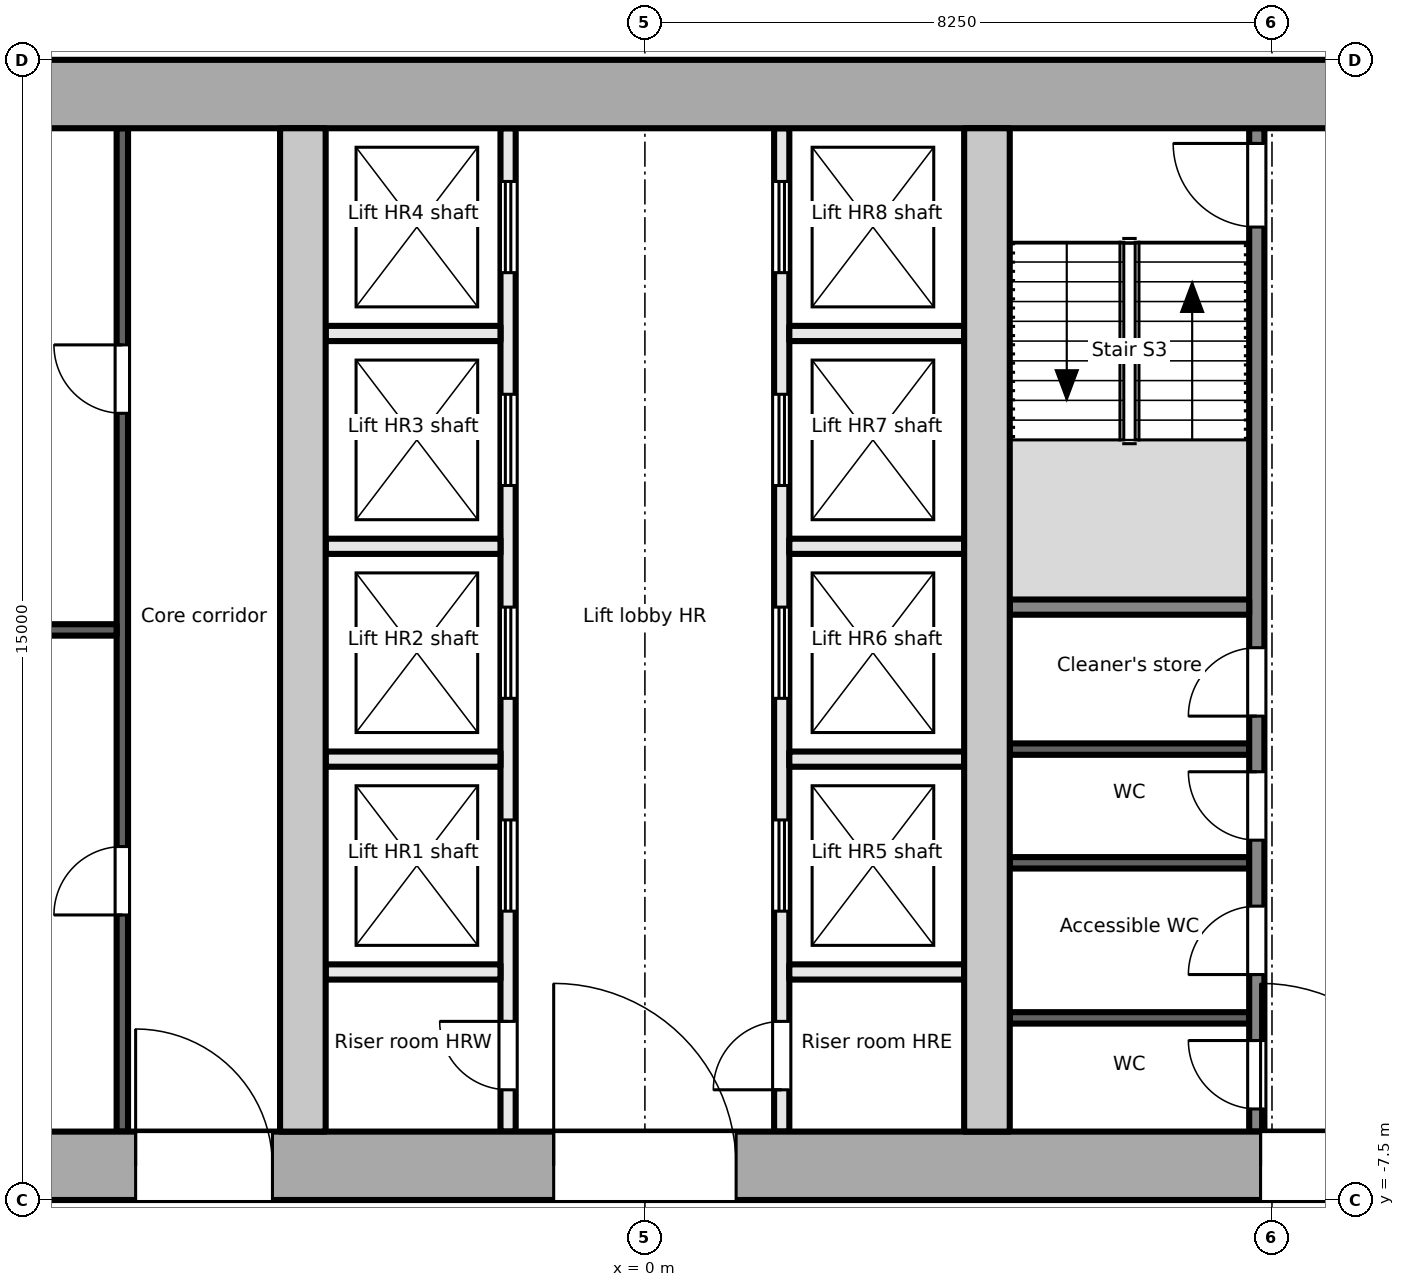
"""IFC4 building model, lengths in metres.
Left out: names, types, materials, properties, quantities, classifications, styles, units other than length and angle.
Written with IfcOpenShell. Run it as: python <this file> out.ifc"""

import sys

from ifc_helpers import new_model, si_unit, direction, frame, frame_2d, origin, place, context, subcontext, project, spatial, rectangle, extrude, element, fill, save


model = new_model("IFC4")
c1 = context("Model", 3, precision=1e-05, world=origin(), true_north=direction((0.0, 1.0)))
c2 = subcontext(c1, "Body", "Model", "MODEL_VIEW")
j1 = project(units=[si_unit("LENGTHUNIT", "METRE"), si_unit("PLANEANGLEUNIT", "RADIAN")], contexts=[c1])
p1 = place(None, origin())
s1 = spatial("IfcSite", under=j1, at=p1, CompositionType="ELEMENT")
p2 = place(p1, origin())
s2 = spatial("IfcBuilding", under=s1, at=p2, CompositionType="ELEMENT")
p3 = place(p2, frame((0.0, 0.0, 274.6)))
s3 = spatial("IfcBuildingStorey", under=s2, at=p3, CompositionType="ELEMENT", Elevation=274.6)
p4 = place(p3, frame((-18.0, -7.05, -0.2), z_axis=(0.0, 0.0, 1.0), x_axis=(1.0, 0.0, 0.0)))
e1 = element("IfcWall", 1, at=p4, inside=s3, PredefinedType="SHEAR", context=c2, shape_type="SweptSolid", body=[
    extrude(rectangle(XDim=36.0, YDim=0.9, at=frame_2d((18.0, 0.0))), origin(), (0.0, 0.0, 1.0), 3.9),
])
p5 = place(p4, frame((11.3, 0.0, 0.2)))
e2 = element("IfcOpeningElement", 2, at=p5, cuts=e1, PredefinedType="OPENING", context=c2, shape_type="SweptSolid", body=[
    extrude(rectangle(XDim=1.8, YDim=2.1, at=frame_2d((0.9, 1.05))), frame((0.0, 0.46, 0.0), z_axis=(0.0, -1.0, 0.0), x_axis=(1.0, 0.0, 0.0)), (0.0, 0.0, 1.0), 0.921),
])
p6 = place(p4, frame((16.8, 0.0, 0.2)))
e3 = element("IfcOpeningElement", 3, at=p6, cuts=e1, PredefinedType="OPENING", context=c2, shape_type="SweptSolid", body=[
    extrude(rectangle(XDim=2.4, YDim=2.1, at=frame_2d((1.2, 1.05))), frame((0.0, 0.46, 0.0), z_axis=(0.0, -1.0, 0.0), x_axis=(1.0, 0.0, 0.0)), (0.0, 0.0, 1.0), 0.921),
])
p7 = place(p4, frame((26.1, 0.0, 0.2)))
e4 = element("IfcOpeningElement", 4, at=p7, cuts=e1, PredefinedType="OPENING", context=c2, shape_type="SweptSolid", body=[
    extrude(rectangle(XDim=2.4, YDim=2.1, at=frame_2d((1.2, 1.05))), frame((0.0, 0.46, 0.0), z_axis=(0.0, -1.0, 0.0), x_axis=(1.0, 0.0, 0.0)), (0.0, 0.0, 1.0), 0.921),
])
p8 = place(p3, frame((-18.0, 7.05, -0.2), z_axis=(0.0, 0.0, 1.0), x_axis=(1.0, 0.0, 0.0)))
e5 = element("IfcWall", 5, at=p8, inside=s3, PredefinedType="SHEAR", context=c2, shape_type="SweptSolid", body=[
    extrude(rectangle(XDim=36.0, YDim=0.9, at=frame_2d((18.0, 0.0))), origin(), (0.0, 0.0, 1.0), 3.9),
])
for number, where, z_axis, x_axis in (
    (6, (-4.5, -6.6, -0.2), (0.0, 0.0, 1.0), (0.0, 1.0, 0.0)),
    (7, (4.5, -6.6, -0.2), (0.0, 0.0, 1.0), (0.0, 1.0, 0.0)),
):
    element("IfcWall", number, at=place(p3, frame(where, z_axis=z_axis, x_axis=x_axis)), inside=s3, PredefinedType="SHEAR", context=c2, shape_type="SweptSolid", body=[
        extrude(rectangle(XDim=13.2, YDim=0.6, at=frame_2d((6.6, 0.0))), origin(), (0.0, 0.0, 1.0), 3.9),
    ])
p9 = place(p3, frame((-6.875, -6.6, 0.0), z_axis=(0.0, 0.0, 1.0), x_axis=(0.0, 1.0, 0.0)))
e8 = element("IfcWall", 8, at=p9, inside=s3, PredefinedType="PARTITIONING", context=c2, shape_type="SweptSolid", body=[
    extrude(rectangle(XDim=13.2, YDim=0.15, at=frame_2d((6.6, 0.0))), origin(), (0.0, 0.0, 1.0), 3.7),
])
p10 = place(p9, frame((2.85, 0.0, 0.0)))
e9 = element("IfcOpeningElement", 9, at=p10, cuts=e8, PredefinedType="OPENING", context=c2, shape_type="SweptSolid", body=[
    extrude(rectangle(XDim=0.9, YDim=2.1, at=frame_2d((0.45, 1.05))), frame((0.0, 0.085, 0.0), z_axis=(0.0, -1.0, 0.0), x_axis=(1.0, 0.0, 0.0)), (0.0, 0.0, 1.0), 0.171),
])
p11 = place(p9, frame((9.45, 0.0, 0.0)))
e10 = element("IfcOpeningElement", 10, at=p11, cuts=e8, PredefinedType="OPENING", context=c2, shape_type="SweptSolid", body=[
    extrude(rectangle(XDim=0.9, YDim=2.1, at=frame_2d((0.45, 1.05))), frame((0.0, 0.085, 0.0), z_axis=(0.0, -1.0, 0.0), x_axis=(1.0, 0.0, 0.0)), (0.0, 0.0, 1.0), 0.171),
])
p12 = place(p3, frame((-13.2, 0.0, 0.0), z_axis=(0.0, 0.0, 1.0), x_axis=(1.0, 0.0, 0.0)))
e11 = element("IfcWall", 11, at=p12, inside=s3, PredefinedType="PARTITIONING", context=c2, shape_type="SweptSolid", body=[
    extrude(rectangle(XDim=6.25, YDim=0.15, at=frame_2d((3.125, 0.0))), origin(), (0.0, 0.0, 1.0), 3.7),
])
p13 = place(p3, frame((-1.8, -6.6, 0.0), z_axis=(0.0, 0.0, 1.0), x_axis=(0.0, 1.0, 0.0)))
e12 = element("IfcWall", 12, at=p13, inside=s3, PredefinedType="PARTITIONING", context=c2, shape_type="SweptSolid", body=[
    extrude(rectangle(XDim=13.2, YDim=0.2, at=frame_2d((6.6, 0.0))), origin(), (0.0, 0.0, 1.0), 3.7),
])
p14 = place(p13, frame((0.55, 0.0, 0.0)))
e13 = element("IfcOpeningElement", 13, at=p14, cuts=e12, PredefinedType="OPENING", context=c2, shape_type="SweptSolid", body=[
    extrude(rectangle(XDim=0.9, YDim=2.1, at=frame_2d((0.45, 1.05))), frame((0.0, 0.111, 0.0), z_axis=(0.0, -1.0, 0.0), x_axis=(1.0, 0.0, 0.0)), (0.0, 0.0, 1.0), 0.221),
])
p15 = place(p13, frame((2.9, 0.0, 0.0)))
e14 = element("IfcOpeningElement", 14, at=p15, cuts=e12, PredefinedType="OPENING", context=c2, shape_type="SweptSolid", body=[
    extrude(rectangle(XDim=1.2, YDim=2.1, at=frame_2d((0.6, 1.05))), frame((0.0, 0.111, 0.0), z_axis=(0.0, -1.0, 0.0), x_axis=(1.0, 0.0, 0.0)), (0.0, 0.0, 1.0), 0.221),
])
p16 = place(p13, frame((5.7, 0.0, 0.0)))
e15 = element("IfcOpeningElement", 15, at=p16, cuts=e12, PredefinedType="OPENING", context=c2, shape_type="SweptSolid", body=[
    extrude(rectangle(XDim=1.2, YDim=2.1, at=frame_2d((0.6, 1.05))), frame((0.0, 0.111, 0.0), z_axis=(0.0, -1.0, 0.0), x_axis=(1.0, 0.0, 0.0)), (0.0, 0.0, 1.0), 0.221),
])
p17 = place(p13, frame((8.5, 0.0, 0.0)))
e16 = element("IfcOpeningElement", 16, at=p17, cuts=e12, PredefinedType="OPENING", context=c2, shape_type="SweptSolid", body=[
    extrude(rectangle(XDim=1.2, YDim=2.1, at=frame_2d((0.6, 1.05))), frame((0.0, 0.111, 0.0), z_axis=(0.0, -1.0, 0.0), x_axis=(1.0, 0.0, 0.0)), (0.0, 0.0, 1.0), 0.221),
])
p18 = place(p13, frame((11.3, 0.0, 0.0)))
e17 = element("IfcOpeningElement", 17, at=p18, cuts=e12, PredefinedType="OPENING", context=c2, shape_type="SweptSolid", body=[
    extrude(rectangle(XDim=1.2, YDim=2.1, at=frame_2d((0.6, 1.05))), frame((0.0, 0.111, 0.0), z_axis=(0.0, -1.0, 0.0), x_axis=(1.0, 0.0, 0.0)), (0.0, 0.0, 1.0), 0.221),
])
p19 = place(p3, frame((1.8, -6.6, 0.0), z_axis=(0.0, 0.0, 1.0), x_axis=(0.0, 1.0, 0.0)))
e18 = element("IfcWall", 18, at=p19, inside=s3, PredefinedType="PARTITIONING", context=c2, shape_type="SweptSolid", body=[
    extrude(rectangle(XDim=13.2, YDim=0.2, at=frame_2d((6.6, 0.0))), origin(), (0.0, 0.0, 1.0), 3.7),
])
p20 = place(p19, frame((0.55, 0.0, 0.0)))
e19 = element("IfcOpeningElement", 19, at=p20, cuts=e18, PredefinedType="OPENING", context=c2, shape_type="SweptSolid", body=[
    extrude(rectangle(XDim=0.9, YDim=2.1, at=frame_2d((0.45, 1.05))), frame((0.0, 0.111, 0.0), z_axis=(0.0, -1.0, 0.0), x_axis=(1.0, 0.0, 0.0)), (0.0, 0.0, 1.0), 0.221),
])
p21 = place(p19, frame((2.9, 0.0, 0.0)))
e20 = element("IfcOpeningElement", 20, at=p21, cuts=e18, PredefinedType="OPENING", context=c2, shape_type="SweptSolid", body=[
    extrude(rectangle(XDim=1.2, YDim=2.1, at=frame_2d((0.6, 1.05))), frame((0.0, 0.111, 0.0), z_axis=(0.0, -1.0, 0.0), x_axis=(1.0, 0.0, 0.0)), (0.0, 0.0, 1.0), 0.221),
])
p22 = place(p19, frame((5.7, 0.0, 0.0)))
e21 = element("IfcOpeningElement", 21, at=p22, cuts=e18, PredefinedType="OPENING", context=c2, shape_type="SweptSolid", body=[
    extrude(rectangle(XDim=1.2, YDim=2.1, at=frame_2d((0.6, 1.05))), frame((0.0, 0.111, 0.0), z_axis=(0.0, -1.0, 0.0), x_axis=(1.0, 0.0, 0.0)), (0.0, 0.0, 1.0), 0.221),
])
p23 = place(p19, frame((8.5, 0.0, 0.0)))
e22 = element("IfcOpeningElement", 22, at=p23, cuts=e18, PredefinedType="OPENING", context=c2, shape_type="SweptSolid", body=[
    extrude(rectangle(XDim=1.2, YDim=2.1, at=frame_2d((0.6, 1.05))), frame((0.0, 0.111, 0.0), z_axis=(0.0, -1.0, 0.0), x_axis=(1.0, 0.0, 0.0)), (0.0, 0.0, 1.0), 0.221),
])
p24 = place(p19, frame((11.3, 0.0, 0.0)))
e23 = element("IfcOpeningElement", 23, at=p24, cuts=e18, PredefinedType="OPENING", context=c2, shape_type="SweptSolid", body=[
    extrude(rectangle(XDim=1.2, YDim=2.1, at=frame_2d((0.6, 1.05))), frame((0.0, 0.111, 0.0), z_axis=(0.0, -1.0, 0.0), x_axis=(1.0, 0.0, 0.0)), (0.0, 0.0, 1.0), 0.221),
])
for number, where, z_axis, x_axis in (
    (24, (-4.2, -1.7, 0.0), (0.0, 0.0, 1.0), (1.0, 0.0, 0.0)),
    (25, (-4.2, 1.1, 0.0), (0.0, 0.0, 1.0), (1.0, 0.0, 0.0)),
    (26, (-4.2, 3.9, 0.0), (0.0, 0.0, 1.0), (1.0, 0.0, 0.0)),
    (27, (-4.2, -4.5, 0.0), (0.0, 0.0, 1.0), (1.0, 0.0, 0.0)),
    (28, (1.9, -1.7, 0.0), (0.0, 0.0, 1.0), (1.0, 0.0, 0.0)),
    (29, (1.9, 1.1, 0.0), (0.0, 0.0, 1.0), (1.0, 0.0, 0.0)),
    (30, (1.9, 3.9, 0.0), (0.0, 0.0, 1.0), (1.0, 0.0, 0.0)),
    (31, (1.9, -4.5, 0.0), (0.0, 0.0, 1.0), (1.0, 0.0, 0.0)),
):
    element("IfcWall", number, at=place(p3, frame(where, z_axis=z_axis, x_axis=x_axis)), inside=s3, PredefinedType="PARTITIONING", context=c2, shape_type="SweptSolid", body=[
        extrude(rectangle(XDim=2.3, YDim=0.2, at=frame_2d((1.15, 0.0))), origin(), (0.0, 0.0, 1.0), 3.7),
    ])
p25 = place(p3, frame((8.05, -6.6, 0.0), z_axis=(0.0, 0.0, 1.0), x_axis=(0.0, 1.0, 0.0)))
e32 = element("IfcWall", 32, at=p25, inside=s3, PredefinedType="PARTITIONING", context=c2, shape_type="SweptSolid", body=[
    extrude(rectangle(XDim=13.2, YDim=0.2, at=frame_2d((6.6, 0.0))), origin(), (0.0, 0.0, 1.0), 3.7),
])
p26 = place(p25, frame((0.298, 0.0, 0.0)))
e33 = element("IfcOpeningElement", 33, at=p26, cuts=e32, PredefinedType="OPENING", context=c2, shape_type="SweptSolid", body=[
    extrude(rectangle(XDim=0.9, YDim=2.1, at=frame_2d((0.45, 1.05))), frame((0.0, 0.111, 0.0), z_axis=(0.0, -1.0, 0.0), x_axis=(1.0, 0.0, 0.0)), (0.0, 0.0, 1.0), 0.221),
])
p27 = place(p25, frame((2.066, 0.0, 0.0)))
e34 = element("IfcOpeningElement", 34, at=p27, cuts=e32, PredefinedType="OPENING", context=c2, shape_type="SweptSolid", body=[
    extrude(rectangle(XDim=0.9, YDim=2.1, at=frame_2d((0.45, 1.05))), frame((0.0, 0.111, 0.0), z_axis=(0.0, -1.0, 0.0), x_axis=(1.0, 0.0, 0.0)), (0.0, 0.0, 1.0), 0.221),
])
p28 = place(p25, frame((3.834, 0.0, 0.0)))
e35 = element("IfcOpeningElement", 35, at=p28, cuts=e32, PredefinedType="OPENING", context=c2, shape_type="SweptSolid", body=[
    extrude(rectangle(XDim=0.9, YDim=2.1, at=frame_2d((0.45, 1.05))), frame((0.0, 0.111, 0.0), z_axis=(0.0, -1.0, 0.0), x_axis=(1.0, 0.0, 0.0)), (0.0, 0.0, 1.0), 0.221),
])
p29 = place(p25, frame((5.466, 0.0, 0.0)))
e36 = element("IfcOpeningElement", 36, at=p29, cuts=e32, PredefinedType="OPENING", context=c2, shape_type="SweptSolid", body=[
    extrude(rectangle(XDim=0.9, YDim=2.1, at=frame_2d((0.45, 1.05))), frame((0.0, 0.111, 0.0), z_axis=(0.0, -1.0, 0.0), x_axis=(1.0, 0.0, 0.0)), (0.0, 0.0, 1.0), 0.221),
])
p30 = place(p25, frame((11.9, 0.0, 0.0)))
e37 = element("IfcOpeningElement", 37, at=p30, cuts=e32, PredefinedType="OPENING", context=c2, shape_type="SweptSolid", body=[
    extrude(rectangle(XDim=1.1, YDim=2.1, at=frame_2d((0.55, 1.05))), frame((0.0, 0.111, 0.0), z_axis=(0.0, -1.0, 0.0), x_axis=(1.0, 0.0, 0.0)), (0.0, 0.0, 1.0), 0.221),
])
p31 = place(p3, frame((4.8, 0.3, 0.0), z_axis=(0.0, 0.0, 1.0), x_axis=(1.0, 0.0, 0.0)))
e38 = element("IfcWall", 38, at=p31, inside=s3, PredefinedType="PARTITIONING", context=c2, shape_type="SweptSolid", body=[
    extrude(rectangle(XDim=3.15, YDim=0.2, at=frame_2d((1.575, 0.0))), origin(), (0.0, 0.0, 1.0), 3.7),
])
for number, where, z_axis, x_axis in (
    (39, (4.8, -5.104, 0.0), (0.0, 0.0, 1.0), (1.0, 0.0, 0.0)),
    (40, (4.8, -3.064, 0.0), (0.0, 0.0, 1.0), (1.0, 0.0, 0.0)),
    (41, (4.8, -1.568, 0.0), (0.0, 0.0, 1.0), (1.0, 0.0, 0.0)),
):
    element("IfcWall", number, at=place(p3, frame(where, z_axis=z_axis, x_axis=x_axis)), inside=s3, PredefinedType="PARTITIONING", context=c2, shape_type="SweptSolid", body=[
        extrude(rectangle(XDim=3.15, YDim=0.15, at=frame_2d((1.575, 0.0))), origin(), (0.0, 0.0, 1.0), 3.7),
    ])
p32 = place(p10, origin())
e42 = element("IfcDoor", 42, at=p32, inside=s3, OperationType="SINGLE_SWING_LEFT", PredefinedType="DOOR", context=c2, shape_type="SweptSolid", body=[
    extrude(rectangle(XDim=0.9, YDim=2.1, at=frame_2d((0.45, 1.05))), frame((0.0, 0.025, 0.0), z_axis=(0.0, -1.0, 0.0), x_axis=(1.0, 0.0, 0.0)), (0.0, 0.0, 1.0), 0.05),
])
fill(e9, e42)
p33 = place(p11, origin())
e43 = element("IfcDoor", 43, at=p33, inside=s3, OperationType="SINGLE_SWING_RIGHT", PredefinedType="DOOR", context=c2, shape_type="SweptSolid", body=[
    extrude(rectangle(XDim=0.9, YDim=2.1, at=frame_2d((0.45, 1.05))), frame((0.0, 0.025, 0.0), z_axis=(0.0, -1.0, 0.0), x_axis=(1.0, 0.0, 0.0)), (0.0, 0.0, 1.0), 0.05),
])
fill(e10, e43)
p34 = place(p5, origin())
e44 = element("IfcDoor", 44, at=p34, inside=s3, OperationType="SINGLE_SWING_LEFT", PredefinedType="DOOR", context=c2, shape_type="SweptSolid", body=[
    extrude(rectangle(XDim=1.8, YDim=2.1, at=frame_2d((0.9, 1.05))), frame((0.0, 0.025, 0.0), z_axis=(0.0, -1.0, 0.0), x_axis=(1.0, 0.0, 0.0)), (0.0, 0.0, 1.0), 0.05),
])
fill(e2, e44)
p35 = place(p14, origin())
e45 = element("IfcDoor", 45, at=p35, inside=s3, OperationType="SINGLE_SWING_RIGHT", PredefinedType="DOOR", context=c2, shape_type="SweptSolid", body=[
    extrude(rectangle(XDim=0.9, YDim=2.1, at=frame_2d((0.45, 1.05))), frame((0.0, 0.025, 0.0), z_axis=(0.0, -1.0, 0.0), x_axis=(1.0, 0.0, 0.0)), (0.0, 0.0, 1.0), 0.05),
])
fill(e13, e45)
p36 = place(p15, origin())
e46 = element("IfcDoor", 46, at=p36, inside=s3, OperationType="DOUBLE_DOOR_SLIDING", PredefinedType="DOOR", context=c2, shape_type="SweptSolid", body=[
    extrude(rectangle(XDim=1.2, YDim=2.1, at=frame_2d((0.6, 1.05))), frame((0.0, 0.025, 0.0), z_axis=(0.0, -1.0, 0.0), x_axis=(1.0, 0.0, 0.0)), (0.0, 0.0, 1.0), 0.05),
])
fill(e14, e46)
p37 = place(p16, origin())
e47 = element("IfcDoor", 47, at=p37, inside=s3, OperationType="DOUBLE_DOOR_SLIDING", PredefinedType="DOOR", context=c2, shape_type="SweptSolid", body=[
    extrude(rectangle(XDim=1.2, YDim=2.1, at=frame_2d((0.6, 1.05))), frame((0.0, 0.025, 0.0), z_axis=(0.0, -1.0, 0.0), x_axis=(1.0, 0.0, 0.0)), (0.0, 0.0, 1.0), 0.05),
])
fill(e15, e47)
p38 = place(p17, origin())
e48 = element("IfcDoor", 48, at=p38, inside=s3, OperationType="DOUBLE_DOOR_SLIDING", PredefinedType="DOOR", context=c2, shape_type="SweptSolid", body=[
    extrude(rectangle(XDim=1.2, YDim=2.1, at=frame_2d((0.6, 1.05))), frame((0.0, 0.025, 0.0), z_axis=(0.0, -1.0, 0.0), x_axis=(1.0, 0.0, 0.0)), (0.0, 0.0, 1.0), 0.05),
])
fill(e16, e48)
p39 = place(p18, origin())
e49 = element("IfcDoor", 49, at=p39, inside=s3, OperationType="DOUBLE_DOOR_SLIDING", PredefinedType="DOOR", context=c2, shape_type="SweptSolid", body=[
    extrude(rectangle(XDim=1.2, YDim=2.1, at=frame_2d((0.6, 1.05))), frame((0.0, 0.025, 0.0), z_axis=(0.0, -1.0, 0.0), x_axis=(1.0, 0.0, 0.0)), (0.0, 0.0, 1.0), 0.05),
])
fill(e17, e49)
p40 = place(p20, origin())
e50 = element("IfcDoor", 50, at=p40, inside=s3, OperationType="SINGLE_SWING_LEFT", PredefinedType="DOOR", context=c2, shape_type="SweptSolid", body=[
    extrude(rectangle(XDim=0.9, YDim=2.1, at=frame_2d((0.45, 1.05))), frame((0.0, 0.025, 0.0), z_axis=(0.0, -1.0, 0.0), x_axis=(1.0, 0.0, 0.0)), (0.0, 0.0, 1.0), 0.05),
])
fill(e19, e50)
p41 = place(p21, origin())
e51 = element("IfcDoor", 51, at=p41, inside=s3, OperationType="DOUBLE_DOOR_SLIDING", PredefinedType="DOOR", context=c2, shape_type="SweptSolid", body=[
    extrude(rectangle(XDim=1.2, YDim=2.1, at=frame_2d((0.6, 1.05))), frame((0.0, 0.025, 0.0), z_axis=(0.0, -1.0, 0.0), x_axis=(1.0, 0.0, 0.0)), (0.0, 0.0, 1.0), 0.05),
])
fill(e20, e51)
p42 = place(p22, origin())
e52 = element("IfcDoor", 52, at=p42, inside=s3, OperationType="DOUBLE_DOOR_SLIDING", PredefinedType="DOOR", context=c2, shape_type="SweptSolid", body=[
    extrude(rectangle(XDim=1.2, YDim=2.1, at=frame_2d((0.6, 1.05))), frame((0.0, 0.025, 0.0), z_axis=(0.0, -1.0, 0.0), x_axis=(1.0, 0.0, 0.0)), (0.0, 0.0, 1.0), 0.05),
])
fill(e21, e52)
p43 = place(p23, origin())
e53 = element("IfcDoor", 53, at=p43, inside=s3, OperationType="DOUBLE_DOOR_SLIDING", PredefinedType="DOOR", context=c2, shape_type="SweptSolid", body=[
    extrude(rectangle(XDim=1.2, YDim=2.1, at=frame_2d((0.6, 1.05))), frame((0.0, 0.025, 0.0), z_axis=(0.0, -1.0, 0.0), x_axis=(1.0, 0.0, 0.0)), (0.0, 0.0, 1.0), 0.05),
])
fill(e22, e53)
p44 = place(p24, origin())
e54 = element("IfcDoor", 54, at=p44, inside=s3, OperationType="DOUBLE_DOOR_SLIDING", PredefinedType="DOOR", context=c2, shape_type="SweptSolid", body=[
    extrude(rectangle(XDim=1.2, YDim=2.1, at=frame_2d((0.6, 1.05))), frame((0.0, 0.025, 0.0), z_axis=(0.0, -1.0, 0.0), x_axis=(1.0, 0.0, 0.0)), (0.0, 0.0, 1.0), 0.05),
])
fill(e23, e54)
p45 = place(p6, origin())
e55 = element("IfcDoor", 55, at=p45, inside=s3, OperationType="DOUBLE_DOOR_DOUBLE_SWING", PredefinedType="DOOR", context=c2, shape_type="SweptSolid", body=[
    extrude(rectangle(XDim=2.4, YDim=2.1, at=frame_2d((1.2, 1.05))), frame((0.0, 0.025, 0.0), z_axis=(0.0, -1.0, 0.0), x_axis=(1.0, 0.0, 0.0)), (0.0, 0.0, 1.0), 0.05),
])
fill(e3, e55)
p46 = place(p26, origin())
e56 = element("IfcDoor", 56, at=p46, inside=s3, OperationType="SINGLE_SWING_RIGHT", PredefinedType="DOOR", context=c2, shape_type="SweptSolid", body=[
    extrude(rectangle(XDim=0.9, YDim=2.1, at=frame_2d((0.45, 1.05))), frame((0.0, 0.025, 0.0), z_axis=(0.0, -1.0, 0.0), x_axis=(1.0, 0.0, 0.0)), (0.0, 0.0, 1.0), 0.05),
])
fill(e33, e56)
p47 = place(p27, origin())
e57 = element("IfcDoor", 57, at=p47, inside=s3, OperationType="SINGLE_SWING_LEFT", PredefinedType="DOOR", context=c2, shape_type="SweptSolid", body=[
    extrude(rectangle(XDim=0.9, YDim=2.1, at=frame_2d((0.45, 1.05))), frame((0.0, 0.025, 0.0), z_axis=(0.0, -1.0, 0.0), x_axis=(1.0, 0.0, 0.0)), (0.0, 0.0, 1.0), 0.05),
])
fill(e34, e57)
p48 = place(p28, origin())
e58 = element("IfcDoor", 58, at=p48, inside=s3, OperationType="SINGLE_SWING_RIGHT", PredefinedType="DOOR", context=c2, shape_type="SweptSolid", body=[
    extrude(rectangle(XDim=0.9, YDim=2.1, at=frame_2d((0.45, 1.05))), frame((0.0, 0.025, 0.0), z_axis=(0.0, -1.0, 0.0), x_axis=(1.0, 0.0, 0.0)), (0.0, 0.0, 1.0), 0.05),
])
fill(e35, e58)
p49 = place(p29, origin())
e59 = element("IfcDoor", 59, at=p49, inside=s3, OperationType="SINGLE_SWING_LEFT", PredefinedType="DOOR", context=c2, shape_type="SweptSolid", body=[
    extrude(rectangle(XDim=0.9, YDim=2.1, at=frame_2d((0.45, 1.05))), frame((0.0, 0.025, 0.0), z_axis=(0.0, -1.0, 0.0), x_axis=(1.0, 0.0, 0.0)), (0.0, 0.0, 1.0), 0.05),
])
fill(e36, e59)
p50 = place(p30, origin())
e60 = element("IfcDoor", 60, at=p50, inside=s3, OperationType="SINGLE_SWING_RIGHT", PredefinedType="DOOR", context=c2, shape_type="SweptSolid", body=[
    extrude(rectangle(XDim=1.1, YDim=2.1, at=frame_2d((0.55, 1.05))), frame((0.0, 0.025, 0.0), z_axis=(0.0, -1.0, 0.0), x_axis=(1.0, 0.0, 0.0)), (0.0, 0.0, 1.0), 0.05),
])
fill(e37, e60)
p51 = place(p7, origin())
e61 = element("IfcDoor", 61, at=p51, inside=s3, OperationType="DOUBLE_DOOR_DOUBLE_SWING", PredefinedType="DOOR", context=c2, shape_type="SweptSolid", body=[
    extrude(rectangle(XDim=2.4, YDim=2.1, at=frame_2d((1.2, 1.05))), frame((0.0, 0.025, 0.0), z_axis=(0.0, -1.0, 0.0), x_axis=(1.0, 0.0, 0.0)), (0.0, 0.0, 1.0), 0.05),
])
fill(e4, e61)
save(model, sys.argv[1])
